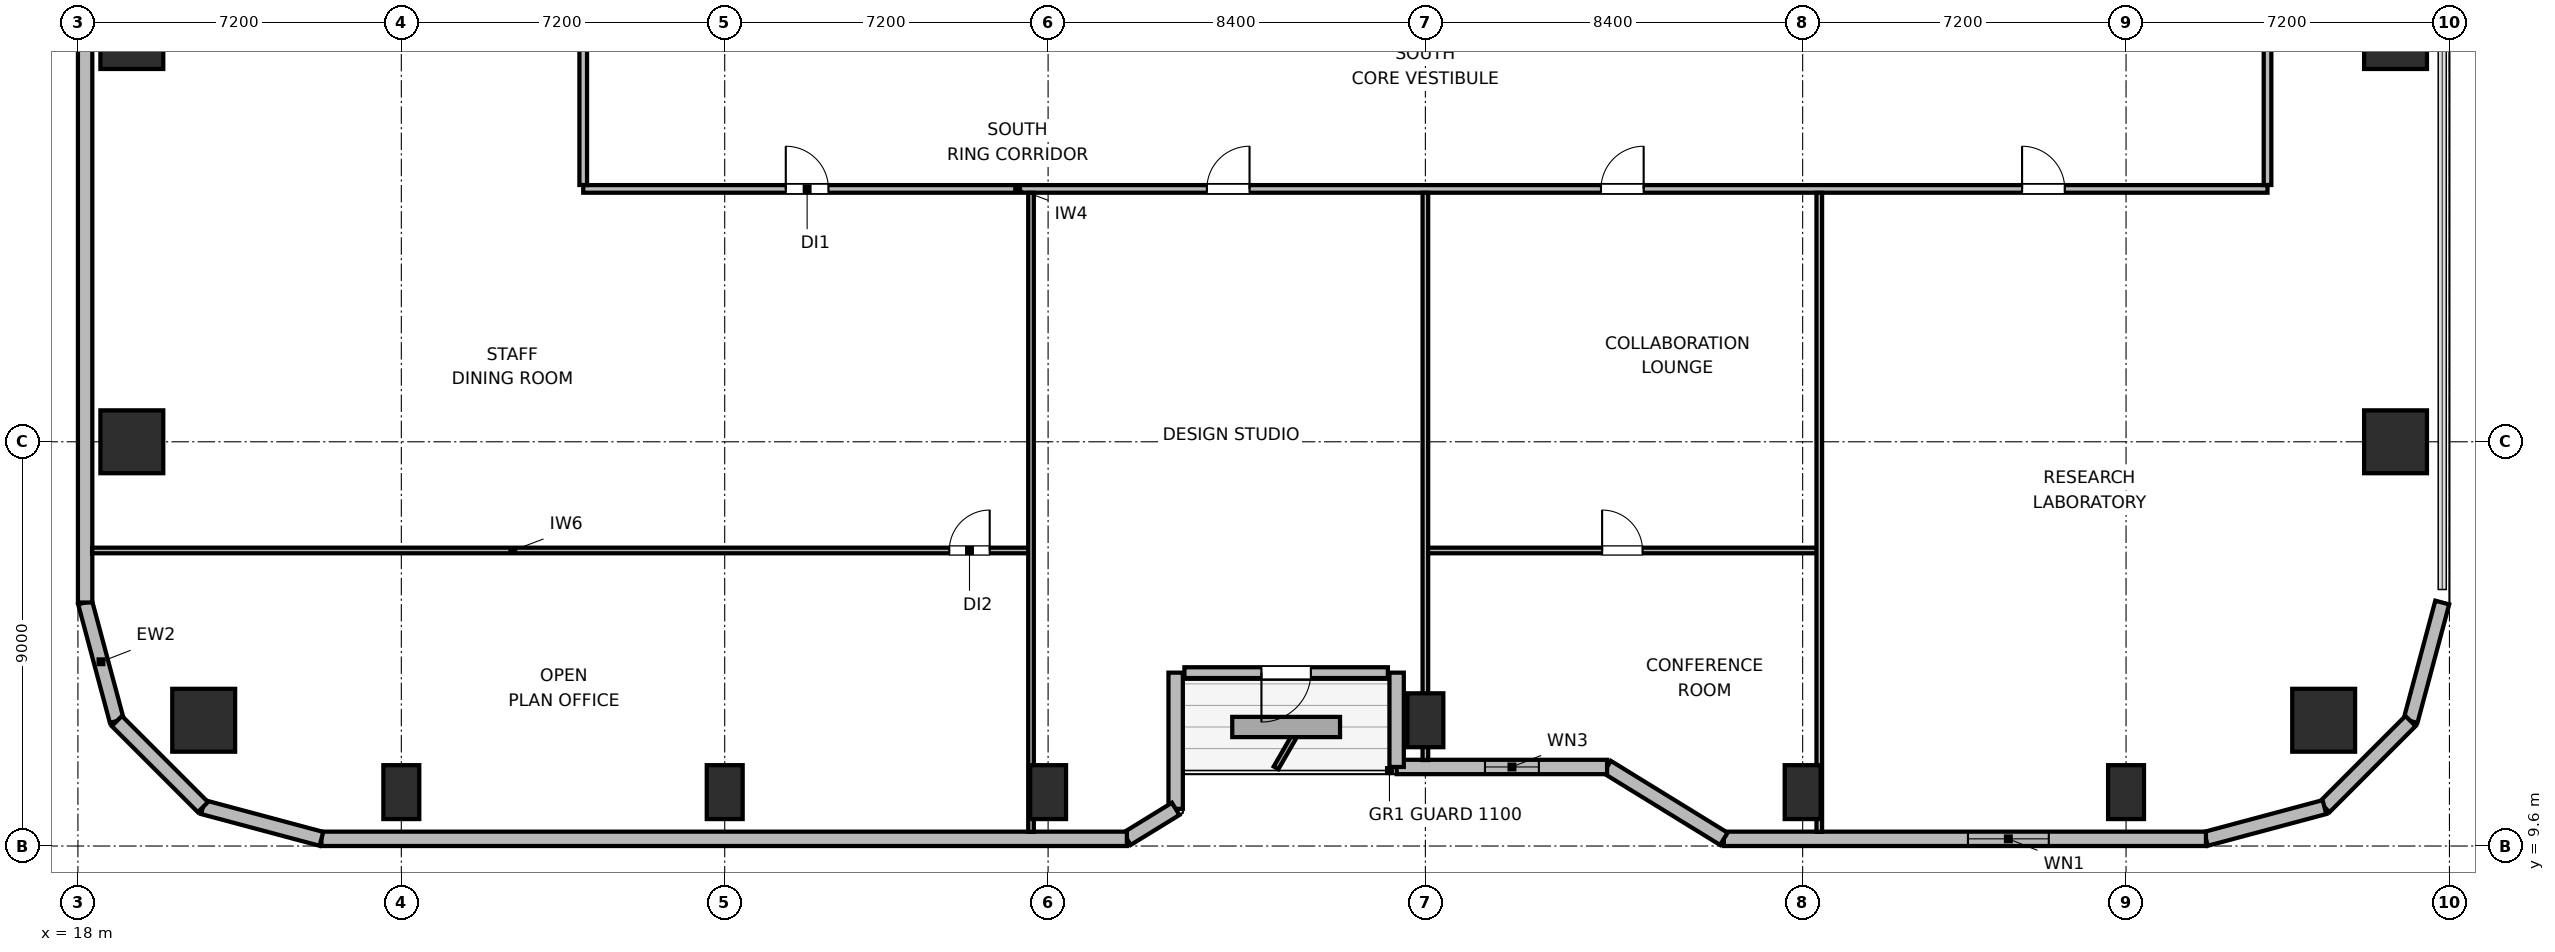
"""IFC4 building model, lengths in metres.
Left out: names, types, materials, properties, quantities, classifications, styles, units other than length and angle.
Written with IfcOpenShell. Run it as: python <this file> out.ifc"""

import sys

from ifc_helpers import new_model, si_unit, direction, frame, frame_2d, origin, origin_2d, place, context, subcontext, project, spatial, rectangle, circle, extrude, element, fill, save


model = new_model("IFC4")
c1 = context("Model", 3, precision=1e-05, world=origin(), true_north=direction((0.0, 1.0)))
c2 = subcontext(c1, "Body", "Model", "MODEL_VIEW")
j1 = project(units=[si_unit("LENGTHUNIT", "METRE"), si_unit("PLANEANGLEUNIT", "RADIAN")], contexts=[c1])
p1 = place(None, origin())
s1 = spatial("IfcSite", under=j1, at=p1, CompositionType="ELEMENT")
p2 = place(p1, origin())
s2 = spatial("IfcBuilding", under=s1, at=p2, CompositionType="ELEMENT")
p3 = place(p2, frame((0.0, 0.0, 93.6)))
s3 = spatial("IfcBuildingStorey", under=s2, at=p3, CompositionType="ELEMENT", Elevation=93.6)
for number, where, z_axis, x_axis in (
    (1, (20.8, 12.4, 0.0), (0.0, 0.0, 1.0), (1.0, 0.0, 0.0)),
    (2, (68.0, 12.4, 0.0), (0.0, 0.0, 1.0), (1.0, 0.0, 0.0)),
):
    element("IfcColumn", number, at=place(p3, frame(where, z_axis=z_axis, x_axis=x_axis)), inside=s3, PredefinedType="COLUMN", context=c2, shape_type="SweptSolid", body=[
        extrude(circle(Radius=0.7, at=origin_2d()), origin(), (0.0, 0.0, 1.0), 3.9),
    ])
for number, where, z_axis, x_axis in (
    (3, (25.2, 10.8, 0.0), (0.0, 0.0, 1.0), (1.0, 0.0, 0.0)),
    (4, (32.4, 10.8, 0.0), (0.0, 0.0, 1.0), (1.0, 0.0, 0.0)),
    (5, (39.6, 10.8, 0.0), (0.0, 0.0, 1.0), (1.0, 0.0, 0.0)),
    (6, (48.0, 12.4, 0.0), (0.0, 0.0, 1.0), (1.0, 0.0, 0.0)),
    (7, (56.4, 10.8, 0.0), (0.0, 0.0, 1.0), (1.0, 0.0, 0.0)),
    (8, (63.6, 10.8, 0.0), (0.0, 0.0, 1.0), (1.0, 0.0, 0.0)),
):
    element("IfcColumn", number, at=place(p3, frame(where, z_axis=z_axis, x_axis=x_axis)), inside=s3, PredefinedType="COLUMN", context=c2, shape_type="SweptSolid", body=[
        extrude(rectangle(XDim=0.8, YDim=1.2, at=origin_2d()), origin(), (0.0, 0.0, 1.0), 3.9),
    ])
for number, where, z_axis, x_axis in (
    (9, (19.2, 18.6, 0.0), (0.0, 0.0, 1.0), (1.0, 0.0, 0.0)),
    (10, (69.6, 18.6, 0.0), (0.0, 0.0, 1.0), (1.0, 0.0, 0.0)),
    (11, (19.2, 27.6, 0.0), (0.0, 0.0, 1.0), (1.0, 0.0, 0.0)),
    (12, (69.6, 27.6, 0.0), (0.0, 0.0, 1.0), (1.0, 0.0, 0.0)),
):
    element("IfcColumn", number, at=place(p3, frame(where, z_axis=z_axis, x_axis=x_axis)), inside=s3, PredefinedType="COLUMN", context=c2, shape_type="SweptSolid", body=[
        extrude(rectangle(XDim=1.4, YDim=1.4, at=origin_2d()), origin(), (0.0, 0.0, 1.0), 3.9),
    ])
p4 = place(p3, frame((18.866, 12.383, 0.0), z_axis=(0.0, 0.0, 1.0), x_axis=(-0.25869736047, 0.965958423373, 0.0)))
e13 = element("IfcWall", 13, at=p4, inside=s3, PredefinedType="SOLIDWALL", context=c2, shape_type="SweptSolid", body=[
    extrude(rectangle(XDim=2.731, YDim=0.32, at=frame_2d((1.366, 0.0))), origin(), (0.0, 0.0, 1.0), 3.64),
])
p5 = place(p3, frame((18.16, 15.021, 0.0), z_axis=(0.0, 0.0, 1.0), x_axis=(0.0, 1.0, 0.0)))
e14 = element("IfcWall", 14, at=p5, inside=s3, PredefinedType="SOLIDWALL", context=c2, shape_type="SweptSolid", body=[
    extrude(rectangle(XDim=14.219, YDim=0.32, at=frame_2d((7.109, 0.0))), origin(), (0.0, 0.0, 1.0), 3.64),
])
p6 = place(p3, frame((70.64, 15.021, 0.0), z_axis=(0.0, 0.0, 1.0), x_axis=(-0.258613949072, -0.965980758269, 0.0)))
e15 = element("IfcWall", 15, at=p6, inside=s3, PredefinedType="SOLIDWALL", context=c2, shape_type="SweptSolid", body=[
    extrude(rectangle(XDim=2.731, YDim=0.32, at=frame_2d((1.366, 0.0))), origin(), (0.0, 0.0, 1.0), 3.64),
])
p7 = place(p3, frame((69.934, 12.383, 0.0), z_axis=(0.0, 0.0, 1.0), x_axis=(-0.707151821269, -0.707061738235, 0.0)))
e16 = element("IfcWall", 16, at=p7, inside=s3, PredefinedType="SOLIDWALL", context=c2, shape_type="SweptSolid", body=[
    extrude(rectangle(XDim=2.71, YDim=0.32, at=frame_2d((1.355, 0.0))), origin(), (0.0, 0.0, 1.0), 3.64),
])
p8 = place(p3, frame((68.017, 10.467, 0.0), z_axis=(0.0, 0.0, 1.0), x_axis=(-0.965958423373, -0.25869736047, 0.0)))
e17 = element("IfcWall", 17, at=p8, inside=s3, PredefinedType="SOLIDWALL", context=c2, shape_type="SweptSolid", body=[
    extrude(rectangle(XDim=2.731, YDim=0.32, at=frame_2d((1.366, 0.0))), origin(), (0.0, 0.0, 1.0), 3.64),
])
p9 = place(p3, frame((65.379, 9.76, 0.0), z_axis=(0.0, 0.0, 1.0), x_axis=(-1.0, 0.0, 0.0)))
e18 = element("IfcWall", 18, at=p9, inside=s3, PredefinedType="SOLIDWALL", context=c2, shape_type="SweptSolid", body=[
    extrude(rectangle(XDim=10.734, YDim=0.32, at=frame_2d((5.367, 0.0))), origin(), (0.0, 0.0, 1.0), 3.64),
])
p10 = place(p9, frame((3.499, 0.0, 0.85)))
e19 = element("IfcOpeningElement", 19, at=p10, cuts=e18, PredefinedType="OPENING", context=c2, shape_type="SweptSolid", body=[
    extrude(rectangle(XDim=1.8, YDim=1.1, at=frame_2d((0.9, 0.55))), frame((0.0, 0.17, 0.0), z_axis=(0.0, -1.0, 0.0), x_axis=(1.0, 0.0, 0.0)), (0.0, 0.0, 1.0), 0.34),
])
p11 = place(p3, frame((54.645, 9.76, 0.0), z_axis=(0.0, 0.0, 1.0), x_axis=(-0.851630857047, 0.524142044989, 0.0)))
e20 = element("IfcWall", 20, at=p11, inside=s3, PredefinedType="SOLIDWALL", context=c2, shape_type="SweptSolid", body=[
    extrude(rectangle(XDim=3.053, YDim=0.32, at=frame_2d((1.526, 0.0))), origin(), (0.0, 0.0, 1.0), 2.875),
])
p12 = place(p3, frame((52.045, 11.36, 0.0), z_axis=(0.0, 0.0, 1.0), x_axis=(-1.0, 0.0, 0.0)))
e21 = element("IfcWall", 21, at=p12, inside=s3, PredefinedType="SOLIDWALL", context=c2, shape_type="SweptSolid", body=[
    extrude(rectangle(XDim=4.685, YDim=0.32, at=frame_2d((2.343, 0.0))), origin(), (0.0, 0.0, 1.0), 2.875),
])
p13 = place(p12, frame((1.518, 0.0, 0.85)))
e22 = element("IfcOpeningElement", 22, at=p13, cuts=e21, PredefinedType="OPENING", context=c2, shape_type="SweptSolid", body=[
    extrude(rectangle(XDim=1.2, YDim=1.1, at=frame_2d((0.6, 0.55))), frame((0.0, 0.17, 0.0), z_axis=(0.0, -1.0, 0.0), x_axis=(1.0, 0.0, 0.0)), (0.0, 0.0, 1.0), 0.34),
])
p14 = place(p3, frame((47.36, 11.36, 0.0), z_axis=(0.0, 0.0, 1.0), x_axis=(0.0, 1.0, 0.0)))
e23 = element("IfcWall", 23, at=p14, inside=s3, PredefinedType="SOLIDWALL", context=c2, shape_type="SweptSolid", body=[
    extrude(rectangle(XDim=2.1, YDim=0.32, at=frame_2d((1.05, 0.0))), origin(), (0.0, 0.0, 1.0), 2.875),
])
p15 = place(p3, frame((47.165, 13.46, 0.0), z_axis=(0.0, 0.0, 1.0), x_axis=(-1.0, 0.0, 0.0)))
e24 = element("IfcWall", 24, at=p15, inside=s3, PredefinedType="SOLIDWALL", context=c2, shape_type="SweptSolid", body=[
    extrude(rectangle(XDim=4.53, YDim=0.24, at=frame_2d((2.265, 0.0))), origin(), (0.0, 0.0, 1.0), 3.64),
])
p16 = place(p15, frame((1.715, 0.0, 0.0)))
e25 = element("IfcOpeningElement", 25, at=p16, cuts=e24, PredefinedType="OPENING", context=c2, shape_type="SweptSolid", body=[
    extrude(rectangle(XDim=1.1, YDim=2.04, at=frame_2d((0.55, 1.02))), frame((0.0, 0.13, 0.0), z_axis=(0.0, -1.0, 0.0), x_axis=(1.0, 0.0, 0.0)), (0.0, 0.0, 1.0), 0.26),
])
p17 = place(p3, frame((42.44, 13.46, 0.0), z_axis=(0.0, 0.0, 1.0), x_axis=(0.0, -1.0, 0.0)))
e26 = element("IfcWall", 26, at=p17, inside=s3, PredefinedType="SOLIDWALL", context=c2, shape_type="SweptSolid", body=[
    extrude(rectangle(XDim=3.032, YDim=0.32, at=frame_2d((1.516, 0.0))), origin(), (0.0, 0.0, 1.0), 2.875),
])
p18 = place(p3, frame((42.44, 10.427, 0.0), z_axis=(0.0, 0.0, 1.0), x_axis=(-0.851776724646, -0.523904964045, 0.0)))
e27 = element("IfcWall", 27, at=p18, inside=s3, PredefinedType="SOLIDWALL", context=c2, shape_type="SweptSolid", body=[
    extrude(rectangle(XDim=1.274, YDim=0.32, at=frame_2d((0.637, 0.0))), origin(), (0.0, 0.0, 1.0), 3.64),
])
p19 = place(p3, frame((41.355, 9.76, 0.0), z_axis=(0.0, 0.0, 1.0), x_axis=(-1.0, 0.0, 0.0)))
e28 = element("IfcWall", 28, at=p19, inside=s3, PredefinedType="SOLIDWALL", context=c2, shape_type="SweptSolid", body=[
    extrude(rectangle(XDim=17.934, YDim=0.32, at=frame_2d((8.967, 0.0))), origin(), (0.0, 0.0, 1.0), 3.64),
])
p20 = place(p3, frame((23.421, 9.76, 0.0), z_axis=(0.0, 0.0, 1.0), x_axis=(-0.965964405026, 0.25867502435, 0.0)))
e29 = element("IfcWall", 29, at=p20, inside=s3, PredefinedType="SOLIDWALL", context=c2, shape_type="SweptSolid", body=[
    extrude(rectangle(XDim=2.731, YDim=0.32, at=frame_2d((1.366, 0.0))), origin(), (0.0, 0.0, 1.0), 3.64),
])
p21 = place(p3, frame((20.783, 10.467, 0.0), z_axis=(0.0, 0.0, 1.0), x_axis=(-0.707106781187, 0.707106781187, 0.0)))
e30 = element("IfcWall", 30, at=p21, inside=s3, PredefinedType="SOLIDWALL", context=c2, shape_type="SweptSolid", body=[
    extrude(rectangle(XDim=2.71, YDim=0.32, at=frame_2d((1.355, 0.0))), origin(), (0.0, 0.0, 1.0), 3.64),
])
p22 = place(p3, frame((29.25, 24.23, 0.0), z_axis=(0.0, 0.0, 1.0), x_axis=(1.0, 0.0, 0.0)))
e31 = element("IfcWall", 31, at=p22, inside=s3, PredefinedType="PARTITIONING", context=c2, shape_type="SweptSolid", body=[
    extrude(rectangle(XDim=37.5, YDim=0.17, at=frame_2d((18.75, 0.0))), origin(), (0.0, 0.0, 1.0), 3.64),
])
p23 = place(p22, frame((4.51, 0.0, 0.0)))
e32 = element("IfcOpeningElement", 32, at=p23, cuts=e31, PredefinedType="OPENING", context=c2, shape_type="SweptSolid", body=[
    extrude(rectangle(XDim=0.95, YDim=2.04, at=frame_2d((0.475, 1.02))), frame((0.0, 0.095, 0.0), z_axis=(0.0, -1.0, 0.0), x_axis=(1.0, 0.0, 0.0)), (0.0, 0.0, 1.0), 0.19),
])
p24 = place(p22, frame((13.885, 0.0, 0.0)))
e33 = element("IfcOpeningElement", 33, at=p24, cuts=e31, PredefinedType="OPENING", context=c2, shape_type="SweptSolid", body=[
    extrude(rectangle(XDim=0.95, YDim=2.04, at=frame_2d((0.475, 1.02))), frame((0.0, 0.095, 0.0), z_axis=(0.0, -1.0, 0.0), x_axis=(1.0, 0.0, 0.0)), (0.0, 0.0, 1.0), 0.19),
])
p25 = place(p22, frame((22.66, 0.0, 0.0)))
e34 = element("IfcOpeningElement", 34, at=p25, cuts=e31, PredefinedType="OPENING", context=c2, shape_type="SweptSolid", body=[
    extrude(rectangle(XDim=0.95, YDim=2.04, at=frame_2d((0.475, 1.02))), frame((0.0, 0.095, 0.0), z_axis=(0.0, -1.0, 0.0), x_axis=(1.0, 0.0, 0.0)), (0.0, 0.0, 1.0), 0.19),
])
p26 = place(p22, frame((32.035, 0.0, 0.0)))
e35 = element("IfcOpeningElement", 35, at=p26, cuts=e31, PredefinedType="OPENING", context=c2, shape_type="SweptSolid", body=[
    extrude(rectangle(XDim=0.95, YDim=2.04, at=frame_2d((0.475, 1.02))), frame((0.0, 0.095, 0.0), z_axis=(0.0, -1.0, 0.0), x_axis=(1.0, 0.0, 0.0)), (0.0, 0.0, 1.0), 0.19),
])
p27 = place(p3, frame((29.25, 24.317, 0.0), z_axis=(0.0, 0.0, 1.0), x_axis=(0.0, 1.0, 0.0)))
e36 = element("IfcWall", 36, at=p27, inside=s3, PredefinedType="PARTITIONING", context=c2, shape_type="SweptSolid", body=[
    extrude(rectangle(XDim=23.366, YDim=0.17, at=frame_2d((11.683, 0.0))), origin(), (0.0, 0.0, 1.0), 3.64),
])
p28 = place(p27, frame((4.023, 0.0, 0.0)))
e37 = element("IfcOpeningElement", 37, at=p28, cuts=e36, PredefinedType="OPENING", context=c2, shape_type="SweptSolid", body=[
    extrude(rectangle(XDim=0.95, YDim=2.04, at=frame_2d((0.475, 1.02))), frame((0.0, 0.095, 0.0), z_axis=(0.0, -1.0, 0.0), x_axis=(1.0, 0.0, 0.0)), (0.0, 0.0, 1.0), 0.19),
])
p29 = place(p27, frame((11.808, 0.0, 0.0)))
e38 = element("IfcOpeningElement", 38, at=p29, cuts=e36, PredefinedType="OPENING", context=c2, shape_type="SweptSolid", body=[
    extrude(rectangle(XDim=0.95, YDim=2.04, at=frame_2d((0.475, 1.02))), frame((0.0, 0.095, 0.0), z_axis=(0.0, -1.0, 0.0), x_axis=(1.0, 0.0, 0.0)), (0.0, 0.0, 1.0), 0.19),
])
p30 = place(p27, frame((18.993, 0.0, 0.0)))
e39 = element("IfcOpeningElement", 39, at=p30, cuts=e36, PredefinedType="OPENING", context=c2, shape_type="SweptSolid", body=[
    extrude(rectangle(XDim=0.95, YDim=2.04, at=frame_2d((0.475, 1.02))), frame((0.0, 0.095, 0.0), z_axis=(0.0, -1.0, 0.0), x_axis=(1.0, 0.0, 0.0)), (0.0, 0.0, 1.0), 0.19),
])
p31 = place(p3, frame((66.75, 24.317, 0.0), z_axis=(0.0, 0.0, 1.0), x_axis=(0.0, 1.0, 0.0)))
e40 = element("IfcWall", 40, at=p31, inside=s3, PredefinedType="PARTITIONING", context=c2, shape_type="SweptSolid", body=[
    extrude(rectangle(XDim=23.366, YDim=0.17, at=frame_2d((11.683, 0.0))), origin(), (0.0, 0.0, 1.0), 3.64),
])
p32 = place(p31, frame((4.823, 0.0, 0.0)))
e41 = element("IfcOpeningElement", 41, at=p32, cuts=e40, PredefinedType="OPENING", context=c2, shape_type="SweptSolid", body=[
    extrude(rectangle(XDim=0.95, YDim=2.04, at=frame_2d((0.475, 1.02))), frame((0.0, 0.095, 0.0), z_axis=(0.0, -1.0, 0.0), x_axis=(1.0, 0.0, 0.0)), (0.0, 0.0, 1.0), 0.19),
])
p33 = place(p31, frame((16.593, 0.0, 0.0)))
e42 = element("IfcOpeningElement", 42, at=p33, cuts=e40, PredefinedType="OPENING", context=c2, shape_type="SweptSolid", body=[
    extrude(rectangle(XDim=0.95, YDim=2.04, at=frame_2d((0.475, 1.02))), frame((0.0, 0.095, 0.0), z_axis=(0.0, -1.0, 0.0), x_axis=(1.0, 0.0, 0.0)), (0.0, 0.0, 1.0), 0.19),
])
p34 = place(p3, frame((18.315, 16.18, 0.0), z_axis=(0.0, 0.0, 1.0), x_axis=(1.0, 0.0, 0.0)))
e43 = element("IfcWall", 43, at=p34, inside=s3, PredefinedType="PARTITIONING", context=c2, shape_type="SweptSolid", body=[
    extrude(rectangle(XDim=20.905, YDim=0.125, at=frame_2d((10.453, 0.0))), origin(), (0.0, 0.0, 1.0), 3.64),
])
p35 = place(p34, frame((19.085, 0.0, 0.0)))
e44 = element("IfcOpeningElement", 44, at=p35, cuts=e43, PredefinedType="OPENING", context=c2, shape_type="SweptSolid", body=[
    extrude(rectangle(XDim=0.9, YDim=2.02, at=frame_2d((0.45, 1.01))), frame((0.0, 0.073, 0.0), z_axis=(0.0, -1.0, 0.0), x_axis=(1.0, 0.0, 0.0)), (0.0, 0.0, 1.0), 0.145),
])
p36 = place(p3, frame((39.22, 9.915, 0.0), z_axis=(0.0, 0.0, 1.0), x_axis=(0.0, 1.0, 0.0)))
e45 = element("IfcWall", 45, at=p36, inside=s3, PredefinedType="PARTITIONING", context=c2, shape_type="SweptSolid", body=[
    extrude(rectangle(XDim=14.228, YDim=0.125, at=frame_2d((7.114, 0.0))), origin(), (0.0, 0.0, 1.0), 3.64),
])
p37 = place(p3, frame((48.0, 16.18, 0.0), z_axis=(0.0, 0.0, 1.0), x_axis=(1.0, 0.0, 0.0)))
e46 = element("IfcWall", 46, at=p37, inside=s3, PredefinedType="PARTITIONING", context=c2, shape_type="SweptSolid", body=[
    extrude(rectangle(XDim=8.77, YDim=0.125, at=frame_2d((4.385, 0.0))), origin(), (0.0, 0.0, 1.0), 3.64),
])
p38 = place(p37, frame((3.935, 0.0, 0.0)))
e47 = element("IfcOpeningElement", 47, at=p38, cuts=e46, PredefinedType="OPENING", context=c2, shape_type="SweptSolid", body=[
    extrude(rectangle(XDim=0.9, YDim=2.02, at=frame_2d((0.45, 1.01))), frame((0.0, 0.073, 0.0), z_axis=(0.0, -1.0, 0.0), x_axis=(1.0, 0.0, 0.0)), (0.0, 0.0, 1.0), 0.145),
])
p39 = place(p3, frame((48.0, 11.515, 0.0), z_axis=(0.0, 0.0, 1.0), x_axis=(0.0, 1.0, 0.0)))
e48 = element("IfcWall", 48, at=p39, inside=s3, PredefinedType="PARTITIONING", context=c2, shape_type="SweptSolid", body=[
    extrude(rectangle(XDim=12.628, YDim=0.125, at=frame_2d((6.314, 0.0))), origin(), (0.0, 0.0, 1.0), 3.003),
])
p40 = place(p3, frame((56.77, 9.915, 0.0), z_axis=(0.0, 0.0, 1.0), x_axis=(0.0, 1.0, 0.0)))
e49 = element("IfcWall", 49, at=p40, inside=s3, PredefinedType="PARTITIONING", context=c2, shape_type="SweptSolid", body=[
    extrude(rectangle(XDim=14.228, YDim=0.125, at=frame_2d((7.114, 0.0))), origin(), (0.0, 0.0, 1.0), 3.64),
])
p41 = place(p10, origin())
e50 = element("IfcWindow", 50, at=p41, inside=s3, PartitioningType="SINGLE_PANEL", PredefinedType="WINDOW", context=c2, shape_type="SweptSolid", body=[
    extrude(rectangle(XDim=1.8, YDim=1.1, at=frame_2d((0.9, 0.55))), frame((0.0, 0.03, 0.0), z_axis=(0.0, -1.0, 0.0), x_axis=(1.0, 0.0, 0.0)), (0.0, 0.0, 1.0), 0.06),
])
fill(e19, e50)
p42 = place(p13, origin())
e51 = element("IfcWindow", 51, at=p42, inside=s3, PartitioningType="SINGLE_PANEL", PredefinedType="WINDOW", context=c2, shape_type="SweptSolid", body=[
    extrude(rectangle(XDim=1.2, YDim=1.1, at=frame_2d((0.6, 0.55))), frame((0.0, 0.03, 0.0), z_axis=(0.0, -1.0, 0.0), x_axis=(1.0, 0.0, 0.0)), (0.0, 0.0, 1.0), 0.06),
])
fill(e22, e51)
p43 = place(p16, origin())
e52 = element("IfcDoor", 52, at=p43, inside=s3, OperationType="SINGLE_SWING_RIGHT", PredefinedType="DOOR", context=c2, shape_type="SweptSolid", body=[
    extrude(rectangle(XDim=1.1, YDim=2.04, at=frame_2d((0.55, 1.02))), frame((0.0, 0.025, 0.0), z_axis=(0.0, -1.0, 0.0), x_axis=(1.0, 0.0, 0.0)), (0.0, 0.0, 1.0), 0.05),
])
fill(e25, e52)
p44 = place(p35, origin())
e53 = element("IfcDoor", 53, at=p44, inside=s3, OperationType="SINGLE_SWING_RIGHT", PredefinedType="DOOR", context=c2, shape_type="SweptSolid", body=[
    extrude(rectangle(XDim=0.9, YDim=2.02, at=frame_2d((0.45, 1.01))), frame((0.0, 0.025, 0.0), z_axis=(0.0, -1.0, 0.0), x_axis=(1.0, 0.0, 0.0)), (0.0, 0.0, 1.0), 0.05),
])
fill(e44, e53)
p45 = place(p23, origin())
e54 = element("IfcDoor", 54, at=p45, inside=s3, OperationType="SINGLE_SWING_LEFT", PredefinedType="DOOR", context=c2, shape_type="SweptSolid", body=[
    extrude(rectangle(XDim=0.95, YDim=2.04, at=frame_2d((0.475, 1.02))), frame((0.0, 0.025, 0.0), z_axis=(0.0, -1.0, 0.0), x_axis=(1.0, 0.0, 0.0)), (0.0, 0.0, 1.0), 0.05),
])
fill(e32, e54)
p46 = place(p24, origin())
e55 = element("IfcDoor", 55, at=p46, inside=s3, OperationType="SINGLE_SWING_RIGHT", PredefinedType="DOOR", context=c2, shape_type="SweptSolid", body=[
    extrude(rectangle(XDim=0.95, YDim=2.04, at=frame_2d((0.475, 1.02))), frame((0.0, 0.025, 0.0), z_axis=(0.0, -1.0, 0.0), x_axis=(1.0, 0.0, 0.0)), (0.0, 0.0, 1.0), 0.05),
])
fill(e33, e55)
p47 = place(p38, origin())
e56 = element("IfcDoor", 56, at=p47, inside=s3, OperationType="SINGLE_SWING_LEFT", PredefinedType="DOOR", context=c2, shape_type="SweptSolid", body=[
    extrude(rectangle(XDim=0.9, YDim=2.02, at=frame_2d((0.45, 1.01))), frame((0.0, 0.025, 0.0), z_axis=(0.0, -1.0, 0.0), x_axis=(1.0, 0.0, 0.0)), (0.0, 0.0, 1.0), 0.05),
])
fill(e47, e56)
p48 = place(p25, origin())
e57 = element("IfcDoor", 57, at=p48, inside=s3, OperationType="SINGLE_SWING_RIGHT", PredefinedType="DOOR", context=c2, shape_type="SweptSolid", body=[
    extrude(rectangle(XDim=0.95, YDim=2.04, at=frame_2d((0.475, 1.02))), frame((0.0, 0.025, 0.0), z_axis=(0.0, -1.0, 0.0), x_axis=(1.0, 0.0, 0.0)), (0.0, 0.0, 1.0), 0.05),
])
fill(e34, e57)
p49 = place(p26, origin())
e58 = element("IfcDoor", 58, at=p49, inside=s3, OperationType="SINGLE_SWING_LEFT", PredefinedType="DOOR", context=c2, shape_type="SweptSolid", body=[
    extrude(rectangle(XDim=0.95, YDim=2.04, at=frame_2d((0.475, 1.02))), frame((0.0, 0.025, 0.0), z_axis=(0.0, -1.0, 0.0), x_axis=(1.0, 0.0, 0.0)), (0.0, 0.0, 1.0), 0.05),
])
fill(e35, e58)
save(model, sys.argv[1])
